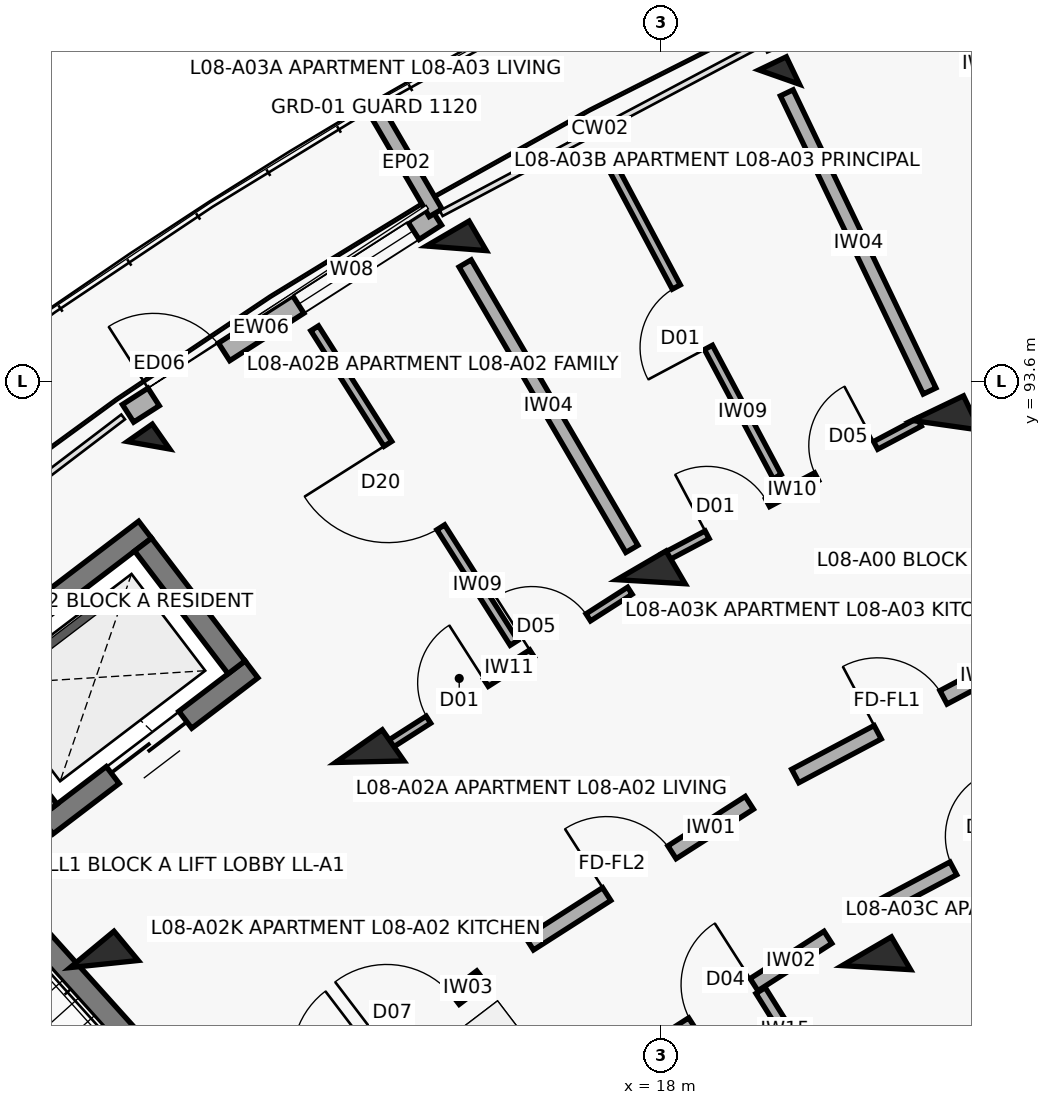
"""IFC4 building model, lengths in metres.
Left out: names, types, materials, properties, quantities, classifications, styles, units other than length and angle.
Written with IfcOpenShell. Run it as: python <this file> out.ifc"""

import sys

from ifc_helpers import new_model, si_unit, direction, frame, frame_2d, origin, origin_2d, place, context, subcontext, project, spatial, rectangle, extrude, element, fill, save


model = new_model("IFC4")
c1 = context("Model", 3, precision=1e-05, world=origin(), true_north=direction((0.0, 1.0)))
c2 = subcontext(c1, "Body", "Model", "MODEL_VIEW")
j1 = project(units=[si_unit("LENGTHUNIT", "METRE"), si_unit("PLANEANGLEUNIT", "RADIAN")], contexts=[c1])
p1 = place(None, origin())
s1 = spatial("IfcSite", under=j1, at=p1, CompositionType="ELEMENT")
p2 = place(p1, origin())
s2 = spatial("IfcBuilding", under=s1, at=p2, CompositionType="ELEMENT")
p3 = place(p2, frame((0.0, 0.0, 26.7)))
s3 = spatial("IfcBuildingStorey", under=s2, at=p3, CompositionType="ELEMENT", Elevation=26.7)
for number, where, z_axis, x_axis in (
    (1, (10.678, 85.93, 0.0), (0.0, 0.0, 1.0), (-0.638, 0.77, 0.0)),
    (2, (14.172, 88.592, 0.0), (0.0, 0.0, 1.0), (-0.573, 0.82, 0.0)),
):
    element("IfcColumn", number, at=place(p3, frame(where, z_axis=z_axis, x_axis=x_axis)), inside=s3, PredefinedType="COLUMN", context=c2, shape_type="SweptSolid", body=[
        extrude(rectangle(XDim=0.5, YDim=0.75, at=origin_2d()), origin(), (0.0, 0.0, 1.0), 3.1),
    ])
p4 = place(p3, frame((11.261, 92.755, 0.0), z_axis=(0.0, 0.0, 1.0), x_axis=(-0.573004420611, 0.819552276527, 0.0)))
e3 = element("IfcColumn", 3, at=p4, inside=s3, PredefinedType="COLUMN", context=c2, shape_type="SweptSolid", body=[
    extrude(rectangle(XDim=0.4, YDim=0.4, at=origin_2d()), origin(), (0.0, 0.0, 1.0), 3.1),
])
for number, where, z_axis, x_axis in (
    (4, (20.837, 85.882, 0.0), (0.0, 0.0, 1.0), (-0.504, 0.864, 0.0)),
    (5, (17.873, 90.96, 0.0), (0.0, 0.0, 1.0), (-0.504, 0.864, 0.0)),
):
    element("IfcColumn", number, at=place(p3, frame(where, z_axis=z_axis, x_axis=x_axis)), inside=s3, PredefinedType="COLUMN", context=c2, shape_type="SweptSolid", body=[
        extrude(rectangle(XDim=0.5, YDim=0.75, at=origin_2d()), origin(), (0.0, 0.0, 1.0), 3.1),
    ])
p5 = place(p3, frame((15.311, 95.347, 0.0), z_axis=(0.0, 0.0, 1.0), x_axis=(-0.504226211181, 0.863571611366, 0.0)))
e6 = element("IfcColumn", 6, at=p5, inside=s3, PredefinedType="COLUMN", context=c2, shape_type="SweptSolid", body=[
    extrude(rectangle(XDim=0.45, YDim=0.65, at=origin_2d()), origin(), (0.0, 0.0, 1.0), 3.1),
])
p6 = place(p3, frame((21.754, 93.019, 0.0), z_axis=(0.0, 0.0, 1.0), x_axis=(-0.432085748802, 0.901832526405, 0.0)))
e7 = element("IfcColumn", 7, at=p6, inside=s3, PredefinedType="COLUMN", context=c2, shape_type="SweptSolid", body=[
    extrude(rectangle(XDim=0.5, YDim=0.75, at=origin_2d()), origin(), (0.0, 0.0, 1.0), 3.1),
])
p7 = place(p3, frame((19.559, 97.6, 0.0), z_axis=(0.0, 0.0, 1.0), x_axis=(-0.432085748802, 0.901832526405, 0.0)))
e8 = element("IfcColumn", 8, at=p7, inside=s3, PredefinedType="COLUMN", context=c2, shape_type="SweptSolid", body=[
    extrude(rectangle(XDim=0.4, YDim=0.4, at=origin_2d()), origin(), (0.0, 0.0, 1.0), 3.1),
])
p8 = place(p3, frame((10.992, 93.176, 0.0), z_axis=(0.0, 0.0, 1.0), x_axis=(0.84226218024, 0.539068103061, 0.0)))
e9 = element("IfcWall", 9, at=p8, inside=s3, PredefinedType="SOLIDWALL", context=c2, shape_type="SweptSolid", body=[
    extrude(rectangle(XDim=4.809, YDim=0.275, at=frame_2d((2.404, 0.0))), origin(), (0.0, 0.0, 1.0), 2.25),
])
p9 = place(p8, frame((0.4, 0.0, 0.0)))
e10 = element("IfcOpeningElement", 10, at=p9, cuts=e9, PredefinedType="OPENING", context=c2, shape_type="SweptSolid", body=[
    extrude(rectangle(XDim=1.1, YDim=2.15, at=frame_2d((0.55, 1.075))), frame((0.0, 0.147, 0.0), z_axis=(0.0, -1.0, 0.0), x_axis=(1.0, 0.0, 0.0)), (0.0, 0.0, 1.0), 0.295),
])
p10 = place(p8, frame((2.659, 0.0, 0.35)))
e11 = element("IfcOpeningElement", 11, at=p10, cuts=e9, PredefinedType="OPENING", context=c2, shape_type="SweptSolid", body=[
    extrude(rectangle(XDim=1.8, YDim=1.65, at=frame_2d((0.9, 0.825))), frame((0.0, 0.147, 0.0), z_axis=(0.0, -1.0, 0.0), x_axis=(1.0, 0.0, 0.0)), (0.0, 0.0, 1.0), 0.295),
])
p11 = place(p3, frame((15.039, 95.813, 0.0), z_axis=(0.0, 0.0, 1.0), x_axis=(-0.504228145431, 0.863570481985, 0.0)))
e12 = element("IfcWall", 12, at=p11, inside=s3, PredefinedType="PARAPET", context=c2, shape_type="SweptSolid", body=[
    extrude(rectangle(XDim=1.53, YDim=0.195, at=frame_2d((0.765, 0.0))), origin(), (0.0, 0.0, 1.0), 2.25),
])
p12 = place(p3, frame((12.345, 83.461, 0.0), z_axis=(0.0, 0.0, 1.0), x_axis=(-0.668868253964, 0.743380964808, 0.0)))
e13 = element("IfcWall", 13, at=p12, inside=s3, PredefinedType="SHEAR", context=c2, shape_type="SweptSolid", body=[
    extrude(rectangle(XDim=7.69, YDim=0.3, at=frame_2d((3.845, 0.0))), origin(), (0.0, 0.0, 1.0), 3.1),
])
p13 = place(p3, frame((12.616, 89.807, 0.0), z_axis=(0.0, 0.0, 1.0), x_axis=(-0.795474703455, -0.605986795371, 0.0)))
e14 = element("IfcWall", 14, at=p13, inside=s3, PredefinedType="SHEAR", context=c2, shape_type="SweptSolid", body=[
    extrude(rectangle(XDim=3.39, YDim=0.28, at=frame_2d((1.695, 0.0))), origin(), (0.0, 0.0, 1.0), 3.1),
])
p14 = place(p13, frame((1.095, 0.0, 0.0)))
e15 = element("IfcOpeningElement", 15, at=p14, cuts=e14, PredefinedType="OPENING", context=c2, shape_type="SweptSolid", body=[
    extrude(rectangle(XDim=1.2, YDim=2.15, at=frame_2d((0.6, 1.075))), frame((0.0, 0.15, 0.0), z_axis=(0.0, -1.0, 0.0), x_axis=(1.0, 0.0, 0.0)), (0.0, 0.0, 1.0), 0.3),
])
p15 = place(p3, frame((11.216, 91.645, 0.0), z_axis=(0.0, 0.0, 1.0), x_axis=(-0.795439986025, -0.606032365994, 0.0)))
e16 = element("IfcWall", 16, at=p15, inside=s3, PredefinedType="SHEAR", context=c2, shape_type="SweptSolid", body=[
    extrude(rectangle(XDim=3.39, YDim=0.28, at=frame_2d((1.695, 0.0))), origin(), (0.0, 0.0, 1.0), 3.1),
])
p16 = place(p3, frame((12.42, 89.834, 0.0), z_axis=(0.0, 0.0, 1.0), x_axis=(-0.605948992168, 0.795503500238, 0.0)))
e17 = element("IfcWall", 17, at=p16, inside=s3, PredefinedType="SHEAR", context=c2, shape_type="SweptSolid", body=[
    extrude(rectangle(XDim=2.03, YDim=0.28, at=frame_2d((1.015, 0.0))), origin(), (0.0, 0.0, 1.0), 3.1),
])
p17 = place(p3, frame((9.946, 87.949, 0.0), z_axis=(0.0, 0.0, 1.0), x_axis=(-0.605891019062, 0.795547656033, 0.0)))
e18 = element("IfcWall", 18, at=p17, inside=s3, PredefinedType="SHEAR", context=c2, shape_type="SweptSolid", body=[
    extrude(rectangle(XDim=2.03, YDim=0.28, at=frame_2d((1.015, 0.0))), origin(), (0.0, 0.0, 1.0), 3.1),
])
p18 = place(p3, frame((13.021, 83.759, 0.0), z_axis=(0.0, 0.0, 1.0), x_axis=(0.795498026433, 0.605956178235, 0.0)))
e19 = element("IfcWall", 19, at=p18, inside=s3, PredefinedType="SOLIDWALL", context=c2, shape_type="SweptSolid", body=[
    extrude(rectangle(XDim=3.296, YDim=0.21, at=frame_2d((1.648, 0.0))), origin(), (0.0, 0.0, 1.0), 2.08),
])
p19 = place(p18, frame((0.45, 0.0, 0.0)))
e20 = element("IfcOpeningElement", 20, at=p19, cuts=e19, PredefinedType="OPENING", context=c2, shape_type="SweptSolid", body=[
    extrude(rectangle(XDim=1.1, YDim=2.15, at=frame_2d((0.55, 1.075))), frame((0.0, 0.115, 0.0), z_axis=(0.0, -1.0, 0.0), x_axis=(1.0, 0.0, 0.0)), (0.0, 0.0, 1.0), 0.23),
])
p20 = place(p18, frame((1.726, 0.0, 0.0)))
e21 = element("IfcOpeningElement", 21, at=p20, cuts=e19, PredefinedType="OPENING", context=c2, shape_type="SweptSolid", body=[
    extrude(rectangle(XDim=1.12, YDim=2.15, at=frame_2d((0.56, 1.075))), frame((0.0, 0.115, 0.0), z_axis=(0.0, -1.0, 0.0), x_axis=(1.0, 0.0, 0.0)), (0.0, 0.0, 1.0), 0.23),
])
p21 = place(p3, frame((16.272, 86.199, 0.0), z_axis=(0.0, 0.0, 1.0), x_axis=(0.842257205985, 0.539075874963, 0.0)))
e22 = element("IfcWall", 22, at=p21, inside=s3, PredefinedType="SOLIDWALL", context=c2, shape_type="SweptSolid", body=[
    extrude(rectangle(XDim=3.436, YDim=0.2, at=frame_2d((1.718, 0.0))), origin(), (0.0, 0.0, 1.0), 2.08),
])
p22 = place(p21, frame((1.208, 0.0, 0.0)))
e23 = element("IfcOpeningElement", 23, at=p22, cuts=e22, PredefinedType="OPENING", context=c2, shape_type="SweptSolid", body=[
    extrude(rectangle(XDim=1.02, YDim=2.15, at=frame_2d((0.51, 1.075))), frame((0.0, 0.11, 0.0), z_axis=(0.0, -1.0, 0.0), x_axis=(1.0, 0.0, 0.0)), (0.0, 0.0, 1.0), 0.22),
])
p23 = place(p3, frame((17.447, 84.519, 0.0), z_axis=(0.0, 0.0, 1.0), x_axis=(0.842225276846, 0.539125758095, 0.0)))
e24 = element("IfcWall", 24, at=p23, inside=s3, PredefinedType="SOLIDWALL", context=c2, shape_type="SweptSolid", body=[
    extrude(rectangle(XDim=3.269, YDim=0.19, at=frame_2d((1.634, 0.0))), origin(), (0.0, 0.0, 1.0), 2.08),
])
p24 = place(p23, frame((1.154, 0.0, 0.0)))
e25 = element("IfcOpeningElement", 25, at=p24, cuts=e24, PredefinedType="OPENING", context=c2, shape_type="SweptSolid", body=[
    extrude(rectangle(XDim=0.96, YDim=2.1, at=frame_2d((0.48, 1.05))), frame((0.0, 0.105, 0.0), z_axis=(0.0, -1.0, 0.0), x_axis=(1.0, 0.0, 0.0)), (0.0, 0.0, 1.0), 0.21),
])
p25 = place(p3, frame((21.064, 82.783, 0.0), z_axis=(0.0, 0.0, 1.0), x_axis=(-0.53015188203, 0.847902696057, 0.0)))
e26 = element("IfcWall", 26, at=p25, inside=s3, PredefinedType="PARTITIONING", context=c2, shape_type="SweptSolid", body=[
    extrude(rectangle(XDim=3.3, YDim=0.145, at=frame_2d((1.65, 0.0))), origin(), (0.0, 0.0, 1.0), 2.08),
])
p26 = place(p25, frame((1.21, 0.0, 0.0)))
e27 = element("IfcOpeningElement", 27, at=p26, cuts=e26, PredefinedType="OPENING", context=c2, shape_type="SweptSolid", body=[
    extrude(rectangle(XDim=0.88, YDim=2.1, at=frame_2d((0.44, 1.05))), frame((0.0, 0.083, 0.0), z_axis=(0.0, -1.0, 0.0), x_axis=(1.0, 0.0, 0.0)), (0.0, 0.0, 1.0), 0.165),
])
p27 = place(p3, frame((14.396, 88.795, 0.0), z_axis=(0.0, 0.0, 1.0), x_axis=(0.842271400662, 0.539053696423, 0.0)))
e28 = element("IfcWall", 28, at=p27, inside=s3, PredefinedType="PARTITIONING", context=c2, shape_type="SweptSolid", body=[
    extrude(rectangle(XDim=3.797, YDim=0.11, at=frame_2d((1.898, 0.0))), origin(), (0.0, 0.0, 1.0), 2.08),
])
p28 = place(p27, frame((0.65, 0.0, 0.0)))
e29 = element("IfcOpeningElement", 29, at=p28, cuts=e28, PredefinedType="OPENING", context=c2, shape_type="SweptSolid", body=[
    extrude(rectangle(XDim=0.9, YDim=2.1, at=frame_2d((0.45, 1.05))), frame((0.0, 0.065, 0.0), z_axis=(0.0, -1.0, 0.0), x_axis=(1.0, 0.0, 0.0)), (0.0, 0.0, 1.0), 0.13),
])
p29 = place(p27, frame((2.267, 0.0, 0.0)))
e30 = element("IfcOpeningElement", 30, at=p29, cuts=e28, PredefinedType="OPENING", context=c2, shape_type="SweptSolid", body=[
    extrude(rectangle(XDim=0.88, YDim=2.1, at=frame_2d((0.44, 1.05))), frame((0.0, 0.065, 0.0), z_axis=(0.0, -1.0, 0.0), x_axis=(1.0, 0.0, 0.0)), (0.0, 0.0, 1.0), 0.13),
])
p30 = place(p3, frame((16.07, 90.156, 0.0), z_axis=(0.0, 0.0, 1.0), x_axis=(-0.535268985628, 0.84468166372, 0.0)))
e31 = element("IfcWall", 31, at=p30, inside=s3, PredefinedType="PARTITIONING", context=c2, shape_type="SweptSolid", body=[
    extrude(rectangle(XDim=4.9, YDim=0.12, at=frame_2d((2.45, 0.0))), origin(), (0.0, 0.0, 1.0), 2.08),
])
p31 = place(p30, frame((1.8, 0.0, 0.0)))
e32 = element("IfcOpeningElement", 32, at=p31, cuts=e31, PredefinedType="OPENING", context=c2, shape_type="SweptSolid", body=[
    extrude(rectangle(XDim=1.3, YDim=2.1, at=frame_2d((0.65, 1.05))), frame((0.0, 0.07, 0.0), z_axis=(0.0, -1.0, 0.0), x_axis=(1.0, 0.0, 0.0)), (0.0, 0.0, 1.0), 0.14),
])
p32 = place(p3, frame((19.77, 88.404, 0.0), z_axis=(0.0, 0.0, 1.0), x_axis=(0.883410853063, 0.468599258099, 0.0)))
e33 = element("IfcWall", 33, at=p32, inside=s3, PredefinedType="SOLIDWALL", context=c2, shape_type="SweptSolid", body=[
    extrude(rectangle(XDim=3.436, YDim=0.2, at=frame_2d((1.718, 0.0))), origin(), (0.0, 0.0, 1.0), 2.08),
])
p33 = place(p32, frame((1.228, 0.0, 0.0)))
e34 = element("IfcOpeningElement", 34, at=p33, cuts=e33, PredefinedType="OPENING", context=c2, shape_type="SweptSolid", body=[
    extrude(rectangle(XDim=0.98, YDim=2.15, at=frame_2d((0.49, 1.075))), frame((0.0, 0.11, 0.0), z_axis=(0.0, -1.0, 0.0), x_axis=(1.0, 0.0, 0.0)), (0.0, 0.0, 1.0), 0.22),
])
p34 = place(p3, frame((20.804, 86.634, 0.0), z_axis=(0.0, 0.0, 1.0), x_axis=(0.883444301944, 0.468536194293, 0.0)))
e35 = element("IfcWall", 35, at=p34, inside=s3, PredefinedType="SOLIDWALL", context=c2, shape_type="SweptSolid", body=[
    extrude(rectangle(XDim=3.269, YDim=0.19, at=frame_2d((1.634, 0.0))), origin(), (0.0, 0.0, 1.0), 2.08),
])
p35 = place(p34, frame((1.184, 0.0, 0.0)))
e36 = element("IfcOpeningElement", 36, at=p35, cuts=e35, PredefinedType="OPENING", context=c2, shape_type="SweptSolid", body=[
    extrude(rectangle(XDim=0.9, YDim=2.1, at=frame_2d((0.45, 1.05))), frame((0.0, 0.105, 0.0), z_axis=(0.0, -1.0, 0.0), x_axis=(1.0, 0.0, 0.0)), (0.0, 0.0, 1.0), 0.21),
])
p36 = place(p3, frame((18.037, 91.273, 0.0), z_axis=(0.0, 0.0, 1.0), x_axis=(0.883441603894, 0.468541281543, 0.0)))
e37 = element("IfcWall", 37, at=p36, inside=s3, PredefinedType="PARTITIONING", context=c2, shape_type="SweptSolid", body=[
    extrude(rectangle(XDim=3.81, YDim=0.115, at=frame_2d((1.905, 0.0))), origin(), (0.0, 0.0, 1.0), 2.08),
])
p37 = place(p36, frame((0.65, 0.0, 0.0)))
e38 = element("IfcOpeningElement", 38, at=p37, cuts=e37, PredefinedType="OPENING", context=c2, shape_type="SweptSolid", body=[
    extrude(rectangle(XDim=0.9, YDim=2.1, at=frame_2d((0.45, 1.05))), frame((0.0, 0.067, 0.0), z_axis=(0.0, -1.0, 0.0), x_axis=(1.0, 0.0, 0.0)), (0.0, 0.0, 1.0), 0.135),
])
p38 = place(p36, frame((2.28, 0.0, 0.0)))
e39 = element("IfcOpeningElement", 39, at=p38, cuts=e37, PredefinedType="OPENING", context=c2, shape_type="SweptSolid", body=[
    extrude(rectangle(XDim=0.88, YDim=2.1, at=frame_2d((0.44, 1.05))), frame((0.0, 0.067, 0.0), z_axis=(0.0, -1.0, 0.0), x_axis=(1.0, 0.0, 0.0)), (0.0, 0.0, 1.0), 0.135),
])
p39 = place(p3, frame((19.533, 92.344, 0.0), z_axis=(0.0, 0.0, 1.0), x_axis=(-0.469867814586, 0.882736787959, 0.0)))
e40 = element("IfcWall", 40, at=p39, inside=s3, PredefinedType="PARTITIONING", context=c2, shape_type="SweptSolid", body=[
    extrude(rectangle(XDim=4.75, YDim=0.12, at=frame_2d((2.375, 0.0))), origin(), (0.0, 0.0, 1.0), 2.08),
])
p40 = place(p39, frame((1.925, 0.0, 0.0)))
e41 = element("IfcOpeningElement", 41, at=p40, cuts=e40, PredefinedType="OPENING", context=c2, shape_type="SweptSolid", body=[
    extrude(rectangle(XDim=0.9, YDim=2.1, at=frame_2d((0.45, 1.05))), frame((0.0, 0.07, 0.0), z_axis=(0.0, -1.0, 0.0), x_axis=(1.0, 0.0, 0.0)), (0.0, 0.0, 1.0), 0.14),
])
p41 = place(p3, frame((17.621, 91.392, 0.0), z_axis=(0.0, 0.0, 1.0), x_axis=(-0.504216452091, 0.863577309475, 0.0)))
e42 = element("IfcWall", 42, at=p41, inside=s3, PredefinedType="SOLIDWALL", context=c2, shape_type="SweptSolid", body=[
    extrude(rectangle(XDim=4.35, YDim=0.185, at=frame_2d((2.175, 0.0))), origin(), (0.0, 0.0, 1.0), 2.08),
])
p42 = place(p3, frame((22.073, 93.047, 0.0), z_axis=(0.0, 0.0, 1.0), x_axis=(0.918737522346, 0.394868794707, 0.0)))
e43 = element("IfcWall", 43, at=p42, inside=s3, PredefinedType="PARTITIONING", context=c2, shape_type="SweptSolid", body=[
    extrude(rectangle(XDim=3.785, YDim=0.12, at=frame_2d((1.893, 0.0))), origin(), (0.0, 0.0, 1.0), 2.08),
])
p43 = place(p42, frame((0.65, 0.0, 0.0)))
e44 = element("IfcOpeningElement", 44, at=p43, cuts=e43, PredefinedType="OPENING", context=c2, shape_type="SweptSolid", body=[
    extrude(rectangle(XDim=0.9, YDim=2.1, at=frame_2d((0.45, 1.05))), frame((0.0, 0.07, 0.0), z_axis=(0.0, -1.0, 0.0), x_axis=(1.0, 0.0, 0.0)), (0.0, 0.0, 1.0), 0.14),
])
p44 = place(p42, frame((2.255, 0.0, 0.0)))
e45 = element("IfcOpeningElement", 45, at=p44, cuts=e43, PredefinedType="OPENING", context=c2, shape_type="SweptSolid", body=[
    extrude(rectangle(XDim=0.88, YDim=2.1, at=frame_2d((0.44, 1.05))), frame((0.0, 0.07, 0.0), z_axis=(0.0, -1.0, 0.0), x_axis=(1.0, 0.0, 0.0)), (0.0, 0.0, 1.0), 0.14),
])
p45 = place(p3, frame((23.864, 94.083, 0.0), z_axis=(0.0, 0.0, 1.0), x_axis=(-0.392109841969, 0.919918404985, 0.0)))
e46 = element("IfcWall", 46, at=p45, inside=s3, PredefinedType="PARTITIONING", context=c2, shape_type="SweptSolid", body=[
    extrude(rectangle(XDim=5.05, YDim=0.12, at=frame_2d((2.525, 0.0))), origin(), (0.0, 0.0, 1.0), 2.08),
])
p46 = place(p45, frame((2.065, 0.0, 0.0)))
e47 = element("IfcOpeningElement", 47, at=p46, cuts=e46, PredefinedType="OPENING", context=c2, shape_type="SweptSolid", body=[
    extrude(rectangle(XDim=0.92, YDim=2.1, at=frame_2d((0.46, 1.05))), frame((0.0, 0.07, 0.0), z_axis=(0.0, -1.0, 0.0), x_axis=(1.0, 0.0, 0.0)), (0.0, 0.0, 1.0), 0.14),
])
p47 = place(p3, frame((21.538, 93.469, 0.0), z_axis=(0.0, 0.0, 1.0), x_axis=(-0.432086898897, 0.901831975371, 0.0)))
e48 = element("IfcWall", 48, at=p47, inside=s3, PredefinedType="SOLIDWALL", context=c2, shape_type="SweptSolid", body=[
    extrude(rectangle(XDim=4.35, YDim=0.185, at=frame_2d((2.175, 0.0))), origin(), (0.0, 0.0, 1.0), 2.08),
])
p48 = place(p9, origin())
e49 = element("IfcDoor", 49, at=p48, inside=s3, OperationType="SINGLE_SWING_LEFT", PredefinedType="DOOR", context=c2, shape_type="SweptSolid", body=[
    extrude(rectangle(XDim=1.1, YDim=2.15, at=frame_2d((0.55, 1.075))), frame((0.0, 0.025, 0.0), z_axis=(0.0, -1.0, 0.0), x_axis=(1.0, 0.0, 0.0)), (0.0, 0.0, 1.0), 0.05),
])
fill(e10, e49)
p49 = place(p10, origin())
e50 = element("IfcWindow", 50, at=p49, inside=s3, PartitioningType="TRIPLE_PANEL_VERTICAL", PredefinedType="WINDOW", context=c2, shape_type="SweptSolid", body=[
    extrude(rectangle(XDim=1.8, YDim=1.65, at=frame_2d((0.9, 0.825))), frame((0.0, 0.03, 0.0), z_axis=(0.0, -1.0, 0.0), x_axis=(1.0, 0.0, 0.0)), (0.0, 0.0, 1.0), 0.06),
])
fill(e11, e50)
p50 = place(p14, origin())
e51 = element("IfcDoor", 51, at=p50, inside=s3, OperationType="DOUBLE_DOOR_SLIDING", PredefinedType="DOOR", context=c2, shape_type="SweptSolid", body=[
    extrude(rectangle(XDim=1.2, YDim=2.15, at=frame_2d((0.6, 1.075))), frame((0.0, 0.025, 0.0), z_axis=(0.0, -1.0, 0.0), x_axis=(1.0, 0.0, 0.0)), (0.0, 0.0, 1.0), 0.05),
])
fill(e15, e51)
p51 = place(p20, origin())
e52 = element("IfcDoor", 52, at=p51, inside=s3, OperationType="SINGLE_SWING_LEFT", PredefinedType="DOOR", context=c2, shape_type="SweptSolid", body=[
    extrude(rectangle(XDim=1.12, YDim=2.15, at=frame_2d((0.56, 1.075))), frame((0.0, 0.025, 0.0), z_axis=(0.0, -1.0, 0.0), x_axis=(1.0, 0.0, 0.0)), (0.0, 0.0, 1.0), 0.05),
])
fill(e21, e52)
p52 = place(p22, origin())
e53 = element("IfcDoor", 53, at=p52, inside=s3, OperationType="SINGLE_SWING_LEFT", PredefinedType="DOOR", context=c2, shape_type="SweptSolid", body=[
    extrude(rectangle(XDim=1.02, YDim=2.15, at=frame_2d((0.51, 1.075))), frame((0.0, 0.025, 0.0), z_axis=(0.0, -1.0, 0.0), x_axis=(1.0, 0.0, 0.0)), (0.0, 0.0, 1.0), 0.05),
])
fill(e23, e53)
p53 = place(p24, origin())
e54 = element("IfcDoor", 54, at=p53, inside=s3, OperationType="SINGLE_SWING_RIGHT", PredefinedType="DOOR", context=c2, shape_type="SweptSolid", body=[
    extrude(rectangle(XDim=0.96, YDim=2.1, at=frame_2d((0.48, 1.05))), frame((0.0, 0.025, 0.0), z_axis=(0.0, -1.0, 0.0), x_axis=(1.0, 0.0, 0.0)), (0.0, 0.0, 1.0), 0.05),
])
fill(e25, e54)
p54 = place(p28, origin())
e55 = element("IfcDoor", 55, at=p54, inside=s3, OperationType="SINGLE_SWING_RIGHT", PredefinedType="DOOR", context=c2, shape_type="SweptSolid", body=[
    extrude(rectangle(XDim=0.9, YDim=2.1, at=frame_2d((0.45, 1.05))), frame((0.0, 0.025, 0.0), z_axis=(0.0, -1.0, 0.0), x_axis=(1.0, 0.0, 0.0)), (0.0, 0.0, 1.0), 0.05),
])
fill(e29, e55)
p55 = place(p29, origin())
e56 = element("IfcDoor", 56, at=p55, inside=s3, OperationType="SINGLE_SWING_LEFT", PredefinedType="DOOR", context=c2, shape_type="SweptSolid", body=[
    extrude(rectangle(XDim=0.88, YDim=2.1, at=frame_2d((0.44, 1.05))), frame((0.0, 0.025, 0.0), z_axis=(0.0, -1.0, 0.0), x_axis=(1.0, 0.0, 0.0)), (0.0, 0.0, 1.0), 0.05),
])
fill(e30, e56)
p56 = place(p31, origin())
e57 = element("IfcDoor", 57, at=p56, inside=s3, OperationType="SINGLE_SWING_RIGHT", PredefinedType="DOOR", context=c2, shape_type="SweptSolid", body=[
    extrude(rectangle(XDim=1.3, YDim=2.1, at=frame_2d((0.65, 1.05))), frame((0.0, 0.025, 0.0), z_axis=(0.0, -1.0, 0.0), x_axis=(1.0, 0.0, 0.0)), (0.0, 0.0, 1.0), 0.05),
])
fill(e32, e57)
p57 = place(p33, origin())
e58 = element("IfcDoor", 58, at=p57, inside=s3, OperationType="SINGLE_SWING_LEFT", PredefinedType="DOOR", context=c2, shape_type="SweptSolid", body=[
    extrude(rectangle(XDim=0.98, YDim=2.15, at=frame_2d((0.49, 1.075))), frame((0.0, 0.025, 0.0), z_axis=(0.0, -1.0, 0.0), x_axis=(1.0, 0.0, 0.0)), (0.0, 0.0, 1.0), 0.05),
])
fill(e34, e58)
p58 = place(p35, origin())
e59 = element("IfcDoor", 59, at=p58, inside=s3, OperationType="SINGLE_SWING_RIGHT", PredefinedType="DOOR", context=c2, shape_type="SweptSolid", body=[
    extrude(rectangle(XDim=0.9, YDim=2.1, at=frame_2d((0.45, 1.05))), frame((0.0, 0.025, 0.0), z_axis=(0.0, -1.0, 0.0), x_axis=(1.0, 0.0, 0.0)), (0.0, 0.0, 1.0), 0.05),
])
fill(e36, e59)
p59 = place(p37, origin())
e60 = element("IfcDoor", 60, at=p59, inside=s3, OperationType="SINGLE_SWING_LEFT", PredefinedType="DOOR", context=c2, shape_type="SweptSolid", body=[
    extrude(rectangle(XDim=0.9, YDim=2.1, at=frame_2d((0.45, 1.05))), frame((0.0, 0.025, 0.0), z_axis=(0.0, -1.0, 0.0), x_axis=(1.0, 0.0, 0.0)), (0.0, 0.0, 1.0), 0.05),
])
fill(e38, e60)
p60 = place(p38, origin())
e61 = element("IfcDoor", 61, at=p60, inside=s3, OperationType="SINGLE_SWING_RIGHT", PredefinedType="DOOR", context=c2, shape_type="SweptSolid", body=[
    extrude(rectangle(XDim=0.88, YDim=2.1, at=frame_2d((0.44, 1.05))), frame((0.0, 0.025, 0.0), z_axis=(0.0, -1.0, 0.0), x_axis=(1.0, 0.0, 0.0)), (0.0, 0.0, 1.0), 0.05),
])
fill(e39, e61)
p61 = place(p40, origin())
e62 = element("IfcDoor", 62, at=p61, inside=s3, OperationType="SINGLE_SWING_LEFT", PredefinedType="DOOR", context=c2, shape_type="SweptSolid", body=[
    extrude(rectangle(XDim=0.9, YDim=2.1, at=frame_2d((0.45, 1.05))), frame((0.0, 0.025, 0.0), z_axis=(0.0, -1.0, 0.0), x_axis=(1.0, 0.0, 0.0)), (0.0, 0.0, 1.0), 0.05),
])
fill(e41, e62)
save(model, sys.argv[1])
